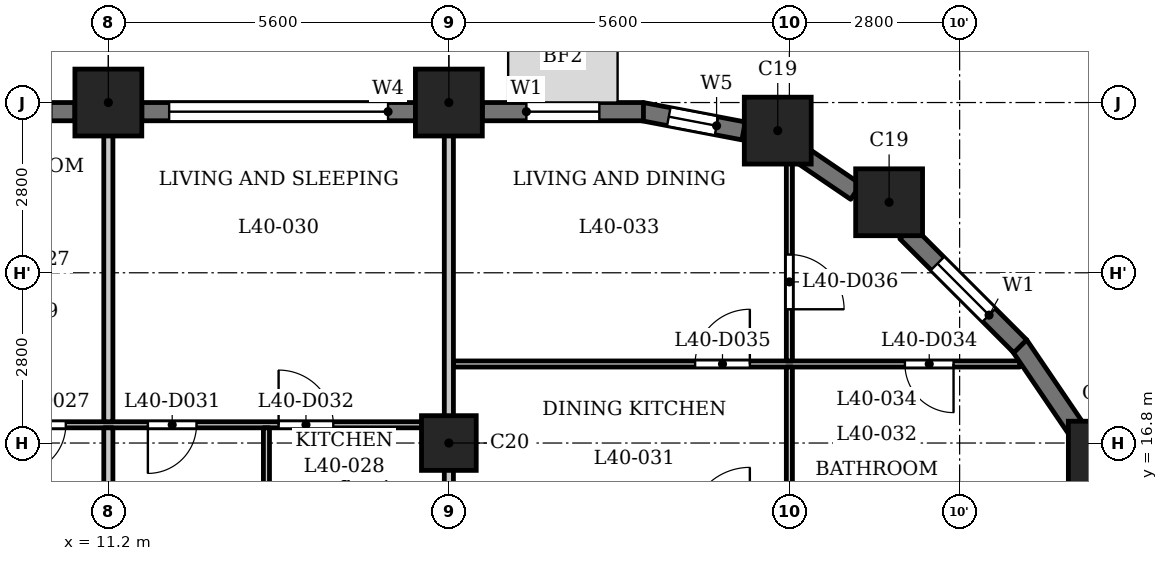
"""IFC4 building model, lengths in metres.
Left out: names, types, materials, properties, quantities, classifications, styles, units other than length and angle.
Written with IfcOpenShell. Run it as: python <this file> out.ifc"""

import sys

from ifc_helpers import new_model, si_unit, direction, frame, frame_2d, origin, origin_2d, place, context, subcontext, project, spatial, rectangle, extrude, element, fill, save


model = new_model("IFC4")
c1 = context("Model", 3, precision=1e-05, world=origin(), true_north=direction((0.0, 1.0)))
c2 = subcontext(c1, "Body", "Model", "MODEL_VIEW")
j1 = project(units=[si_unit("LENGTHUNIT", "METRE"), si_unit("PLANEANGLEUNIT", "RADIAN")], contexts=[c1])
p1 = place(None, origin())
s1 = spatial("IfcSite", under=j1, at=p1, CompositionType="ELEMENT")
p2 = place(p1, origin())
s2 = spatial("IfcBuilding", under=s1, at=p2, CompositionType="ELEMENT")
p3 = place(p2, frame((0.0, 0.0, 157.1)))
s3 = spatial("IfcBuildingStorey", under=s2, at=p3, CompositionType="ELEMENT", Elevation=157.1)
for number, where, z_axis, x_axis in (
    (1, (27.538, 16.609, 0.0), (0.0, 0.0, 1.0), (1.0, 0.0, 0.0)),
    (2, (24.04, 20.76, 0.0), (0.0, 0.0, 1.0), (1.0, 0.0, 0.0)),
    (3, (22.209, 21.938, 0.0), (0.0, 0.0, 1.0), (1.0, 0.0, 0.0)),
    (4, (16.8, 22.4, 0.0), (0.0, 0.0, 1.0), (1.0, 0.0, 0.0)),
    (5, (11.2, 22.4, 0.0), (0.0, 0.0, 1.0), (1.0, 0.0, 0.0)),
):
    element("IfcColumn", number, at=place(p3, frame(where, z_axis=z_axis, x_axis=x_axis)), inside=s3, PredefinedType="COLUMN", context=c2, shape_type="SweptSolid", body=[
        extrude(rectangle(XDim=1.1, YDim=1.1, at=origin_2d()), origin(), (0.0, 0.0, 1.0), 3.5),
    ])
p4 = place(p3, frame((16.8, 16.8, 0.0), z_axis=(0.0, 0.0, 1.0), x_axis=(1.0, 0.0, 0.0)))
e6 = element("IfcColumn", 6, at=p4, inside=s3, PredefinedType="COLUMN", context=c2, shape_type="SweptSolid", body=[
    extrude(rectangle(XDim=0.9, YDim=0.9, at=origin_2d()), origin(), (0.0, 0.0, 1.0), 3.5),
])
p5 = place(p3, frame((27.138, 17.002, 0.0), z_axis=(0.0, 0.0, 1.0), x_axis=(-0.562075160946, 0.827086158419, 0.0)))
e7 = element("IfcWall", 7, at=p5, inside=s3, PredefinedType="SOLIDWALL", context=c2, shape_type="SweptSolid", body=[
    extrude(rectangle(XDim=1.706, YDim=0.3, at=frame_2d((0.853, 0.0))), origin(), (0.0, 0.0, 1.0), 2.45),
])
p6 = place(p3, frame((26.197, 18.391, 0.0), z_axis=(0.0, 0.0, 1.0), x_axis=(-0.707060717099, 0.707152842274, 0.0)))
e8 = element("IfcWall", 8, at=p6, inside=s3, PredefinedType="SOLIDWALL", context=c2, shape_type="SweptSolid", body=[
    extrude(rectangle(XDim=2.65, YDim=0.3, at=frame_2d((1.325, 0.0))), origin(), (0.0, 0.0, 1.0), 2.45),
])
p7 = place(p6, frame((0.725, 0.0, 0.6)))
e9 = element("IfcOpeningElement", 9, at=p7, cuts=e8, PredefinedType="OPENING", context=c2, shape_type="SweptSolid", body=[
    extrude(rectangle(XDim=1.2, YDim=1.55, at=frame_2d((0.6, 0.775))), frame((0.0, 0.16, 0.0), z_axis=(0.0, -1.0, 0.0), x_axis=(1.0, 0.0, 0.0)), (0.0, 0.0, 1.0), 0.32),
])
p8 = place(p3, frame((23.492, 20.932, 0.0), z_axis=(0.0, 0.0, 1.0), x_axis=(-0.826993959827, 0.562210806023, 0.0)))
e10 = element("IfcWall", 10, at=p8, inside=s3, PredefinedType="SOLIDWALL", context=c2, shape_type="SweptSolid", body=[
    extrude(rectangle(XDim=1.077, YDim=0.3, at=frame_2d((0.539, 0.0))), origin(), (0.0, 0.0, 1.0), 3.2),
])
p9 = place(p3, frame((21.648, 21.933, 0.0), z_axis=(0.0, 0.0, 1.0), x_axis=(-0.982297206936, 0.187329114784, 0.0)))
e11 = element("IfcWall", 11, at=p9, inside=s3, PredefinedType="SOLIDWALL", context=c2, shape_type="SweptSolid", body=[
    extrude(rectangle(XDim=1.706, YDim=0.3, at=frame_2d((0.853, 0.0))), origin(), (0.0, 0.0, 1.0), 2.45),
])
p10 = place(p9, frame((0.453, 0.0, 0.6)))
e12 = element("IfcOpeningElement", 12, at=p10, cuts=e11, PredefinedType="OPENING", context=c2, shape_type="SweptSolid", body=[
    extrude(rectangle(XDim=0.8, YDim=1.55, at=frame_2d((0.4, 0.775))), frame((0.0, 0.16, 0.0), z_axis=(0.0, -1.0, 0.0), x_axis=(1.0, 0.0, 0.0)), (0.0, 0.0, 1.0), 0.32),
])
p11 = place(p3, frame((20.0, 22.25, 0.0), z_axis=(0.0, 0.0, 1.0), x_axis=(-1.0, 0.0, 0.0)))
e13 = element("IfcWall", 13, at=p11, inside=s3, PredefinedType="SOLIDWALL", context=c2, shape_type="SweptSolid", body=[
    extrude(rectangle(XDim=2.65, YDim=0.3, at=frame_2d((1.325, 0.0))), origin(), (0.0, 0.0, 1.0), 2.45),
])
p12 = place(p11, frame((0.725, 0.0, 0.6)))
e14 = element("IfcOpeningElement", 14, at=p12, cuts=e13, PredefinedType="OPENING", context=c2, shape_type="SweptSolid", body=[
    extrude(rectangle(XDim=1.2, YDim=1.55, at=frame_2d((0.6, 0.775))), frame((0.0, 0.16, 0.0), z_axis=(0.0, -1.0, 0.0), x_axis=(1.0, 0.0, 0.0)), (0.0, 0.0, 1.0), 0.32),
])
p13 = place(p3, frame((16.25, 22.25, 0.0), z_axis=(0.0, 0.0, 1.0), x_axis=(-1.0, 0.0, 0.0)))
e15 = element("IfcWall", 15, at=p13, inside=s3, PredefinedType="SOLIDWALL", context=c2, shape_type="SweptSolid", body=[
    extrude(rectangle(XDim=4.5, YDim=0.3, at=frame_2d((2.25, 0.0))), origin(), (0.0, 0.0, 1.0), 2.45),
])
p14 = place(p13, frame((0.45, 0.0, 1.2)))
e16 = element("IfcOpeningElement", 16, at=p14, cuts=e15, PredefinedType="OPENING", context=c2, shape_type="SweptSolid", body=[
    extrude(rectangle(XDim=3.6, YDim=0.95, at=frame_2d((1.8, 0.475))), frame((0.0, 0.16, 0.0), z_axis=(0.0, -1.0, 0.0), x_axis=(1.0, 0.0, 0.0)), (0.0, 0.0, 1.0), 0.32),
])
p15 = place(p3, frame((10.65, 22.25, 0.0), z_axis=(0.0, 0.0, 1.0), x_axis=(-1.0, 0.0, 0.0)))
e17 = element("IfcWall", 17, at=p15, inside=s3, PredefinedType="SOLIDWALL", context=c2, shape_type="SweptSolid", body=[
    extrude(rectangle(XDim=4.5, YDim=0.3, at=frame_2d((2.25, 0.0))), origin(), (0.0, 0.0, 1.0), 2.45),
])
p16 = place(p15, frame((0.387, 0.0, 0.6)))
e18 = element("IfcOpeningElement", 18, at=p16, cuts=e17, PredefinedType="OPENING", context=c2, shape_type="SweptSolid", body=[
    extrude(rectangle(XDim=1.2, YDim=1.55, at=frame_2d((0.6, 0.775))), frame((0.0, 0.16, 0.0), z_axis=(0.0, -1.0, 0.0), x_axis=(1.0, 0.0, 0.0)), (0.0, 0.0, 1.0), 0.32),
])
p17 = place(p15, frame((2.413, 0.0, 0.9)))
e19 = element("IfcOpeningElement", 19, at=p17, cuts=e17, PredefinedType="OPENING", context=c2, shape_type="SweptSolid", body=[
    extrude(rectangle(XDim=1.8, YDim=1.25, at=frame_2d((0.9, 0.625))), frame((0.0, 0.16, 0.0), z_axis=(0.0, -1.0, 0.0), x_axis=(1.0, 0.0, 0.0)), (0.0, 0.0, 1.0), 0.32),
])
p18 = place(p3, frame((-16.725, 17.1, 0.0), z_axis=(0.0, 0.0, 1.0), x_axis=(1.0, 0.0, 0.0)))
e20 = element("IfcWall", 20, at=p18, inside=s3, PredefinedType="PARTITIONING", context=c2, shape_type="SweptSolid", body=[
    extrude(rectangle(XDim=33.45, YDim=0.1, at=frame_2d((16.725, 0.0))), origin(), (0.0, 0.0, 1.0), 3.2),
])
p19 = place(p18, frame((11.925, 0.0, 0.0)))
e21 = element("IfcOpeningElement", 21, at=p19, cuts=e20, PredefinedType="OPENING", context=c2, shape_type="SweptSolid", body=[
    extrude(rectangle(XDim=0.9, YDim=2.1, at=frame_2d((0.45, 1.05))), frame((0.0, 0.06, 0.0), z_axis=(0.0, -1.0, 0.0), x_axis=(1.0, 0.0, 0.0)), (0.0, 0.0, 1.0), 0.12),
])
p20 = place(p18, frame((15.175, 0.0, 0.0)))
e22 = element("IfcOpeningElement", 22, at=p20, cuts=e20, PredefinedType="OPENING", context=c2, shape_type="SweptSolid", body=[
    extrude(rectangle(XDim=0.9, YDim=2.1, at=frame_2d((0.45, 1.05))), frame((0.0, 0.06, 0.0), z_axis=(0.0, -1.0, 0.0), x_axis=(1.0, 0.0, 0.0)), (0.0, 0.0, 1.0), 0.12),
])
p21 = place(p18, frame((6.575, 0.0, 0.0)))
e23 = element("IfcOpeningElement", 23, at=p21, cuts=e20, PredefinedType="OPENING", context=c2, shape_type="SweptSolid", body=[
    extrude(rectangle(XDim=0.9, YDim=2.1, at=frame_2d((0.45, 1.05))), frame((0.0, 0.06, 0.0), z_axis=(0.0, -1.0, 0.0), x_axis=(1.0, 0.0, 0.0)), (0.0, 0.0, 1.0), 0.12),
])
p22 = place(p18, frame((17.375, 0.0, 0.0)))
e24 = element("IfcOpeningElement", 24, at=p22, cuts=e20, PredefinedType="OPENING", context=c2, shape_type="SweptSolid", body=[
    extrude(rectangle(XDim=0.8, YDim=2.1, at=frame_2d((0.4, 1.05))), frame((0.0, 0.06, 0.0), z_axis=(0.0, -1.0, 0.0), x_axis=(1.0, 0.0, 0.0)), (0.0, 0.0, 1.0), 0.12),
])
p23 = place(p18, frame((20.025, 0.0, 0.0)))
e25 = element("IfcOpeningElement", 25, at=p23, cuts=e20, PredefinedType="OPENING", context=c2, shape_type="SweptSolid", body=[
    extrude(rectangle(XDim=0.9, YDim=2.1, at=frame_2d((0.45, 1.05))), frame((0.0, 0.06, 0.0), z_axis=(0.0, -1.0, 0.0), x_axis=(1.0, 0.0, 0.0)), (0.0, 0.0, 1.0), 0.12),
])
p24 = place(p18, frame((26.425, 0.0, 0.0)))
e26 = element("IfcOpeningElement", 26, at=p24, cuts=e20, PredefinedType="OPENING", context=c2, shape_type="SweptSolid", body=[
    extrude(rectangle(XDim=0.8, YDim=2.1, at=frame_2d((0.4, 1.05))), frame((0.0, 0.06, 0.0), z_axis=(0.0, -1.0, 0.0), x_axis=(1.0, 0.0, 0.0)), (0.0, 0.0, 1.0), 0.12),
])
p25 = place(p18, frame((23.025, 0.0, 0.0)))
e27 = element("IfcOpeningElement", 27, at=p25, cuts=e20, PredefinedType="OPENING", context=c2, shape_type="SweptSolid", body=[
    extrude(rectangle(XDim=0.9, YDim=2.1, at=frame_2d((0.45, 1.05))), frame((0.0, 0.06, 0.0), z_axis=(0.0, -1.0, 0.0), x_axis=(1.0, 0.0, 0.0)), (0.0, 0.0, 1.0), 0.12),
])
p26 = place(p18, frame((28.575, 0.0, 0.0)))
e28 = element("IfcOpeningElement", 28, at=p26, cuts=e20, PredefinedType="OPENING", context=c2, shape_type="SweptSolid", body=[
    extrude(rectangle(XDim=0.8, YDim=2.1, at=frame_2d((0.4, 1.05))), frame((0.0, 0.06, 0.0), z_axis=(0.0, -1.0, 0.0), x_axis=(1.0, 0.0, 0.0)), (0.0, 0.0, 1.0), 0.12),
])
p27 = place(p18, frame((30.725, 0.0, 0.0)))
e29 = element("IfcOpeningElement", 29, at=p27, cuts=e20, PredefinedType="OPENING", context=c2, shape_type="SweptSolid", body=[
    extrude(rectangle(XDim=0.9, YDim=2.1, at=frame_2d((0.45, 1.05))), frame((0.0, 0.06, 0.0), z_axis=(0.0, -1.0, 0.0), x_axis=(1.0, 0.0, 0.0)), (0.0, 0.0, 1.0), 0.12),
])
p28 = place(p3, frame((16.875, 18.1, 0.0), z_axis=(0.0, 0.0, 1.0), x_axis=(1.0, 0.0, 0.0)))
e30 = element("IfcWall", 30, at=p28, inside=s3, PredefinedType="PARTITIONING", context=c2, shape_type="SweptSolid", body=[
    extrude(rectangle(XDim=9.315, YDim=0.1, at=frame_2d((4.658, 0.0))), origin(), (0.0, 0.0, 1.0), 3.2),
])
p29 = place(p28, frame((7.425, 0.0, 0.0)))
e31 = element("IfcOpeningElement", 31, at=p29, cuts=e30, PredefinedType="OPENING", context=c2, shape_type="SweptSolid", body=[
    extrude(rectangle(XDim=0.8, YDim=2.1, at=frame_2d((0.4, 1.05))), frame((0.0, 0.06, 0.0), z_axis=(0.0, -1.0, 0.0), x_axis=(1.0, 0.0, 0.0)), (0.0, 0.0, 1.0), 0.12),
])
p30 = place(p28, frame((3.975, 0.0, 0.0)))
e32 = element("IfcOpeningElement", 32, at=p30, cuts=e30, PredefinedType="OPENING", context=c2, shape_type="SweptSolid", body=[
    extrude(rectangle(XDim=0.9, YDim=2.1, at=frame_2d((0.45, 1.05))), frame((0.0, 0.06, 0.0), z_axis=(0.0, -1.0, 0.0), x_axis=(1.0, 0.0, 0.0)), (0.0, 0.0, 1.0), 0.12),
])
p31 = place(p3, frame((11.2, 13.275, 0.0), z_axis=(0.0, 0.0, 1.0), x_axis=(0.0, 1.0, 0.0)))
e33 = element("IfcWall", 33, at=p31, inside=s3, PredefinedType="PARTITIONING", context=c2, shape_type="SweptSolid", body=[
    extrude(rectangle(XDim=3.775, YDim=0.15, at=frame_2d((1.888, 0.0))), origin(), (0.0, 0.0, 1.0), 3.2),
])
p32 = place(p3, frame((11.2, 17.15, 0.0), z_axis=(0.0, 0.0, 1.0), x_axis=(0.0, 1.0, 0.0)))
e34 = element("IfcWall", 34, at=p32, inside=s3, PredefinedType="PARTITIONING", context=c2, shape_type="SweptSolid", body=[
    extrude(rectangle(XDim=5.78, YDim=0.15, at=frame_2d((2.89, 0.0))), origin(), (0.0, 0.0, 1.0), 3.2),
])
p33 = place(p3, frame((13.8, 13.275, 0.0), z_axis=(0.0, 0.0, 1.0), x_axis=(0.0, 1.0, 0.0)))
e35 = element("IfcWall", 35, at=p33, inside=s3, PredefinedType="PARTITIONING", context=c2, shape_type="SweptSolid", body=[
    extrude(rectangle(XDim=3.775, YDim=0.1, at=frame_2d((1.888, 0.0))), origin(), (0.0, 0.0, 1.0), 3.2),
])
p34 = place(p3, frame((16.8, 15.475, 0.0), z_axis=(0.0, 0.0, 1.0), x_axis=(0.0, 1.0, 0.0)))
e36 = element("IfcWall", 36, at=p34, inside=s3, PredefinedType="PARTITIONING", context=c2, shape_type="SweptSolid", body=[
    extrude(rectangle(XDim=7.455, YDim=0.15, at=frame_2d((3.728, 0.0))), origin(), (0.0, 0.0, 1.0), 3.2),
])
p35 = place(p3, frame((22.4, 15.475, 0.0), z_axis=(0.0, 0.0, 1.0), x_axis=(0.0, 1.0, 0.0)))
e37 = element("IfcWall", 37, at=p35, inside=s3, PredefinedType="PARTITIONING", context=c2, shape_type="SweptSolid", body=[
    extrude(rectangle(XDim=2.575, YDim=0.1, at=frame_2d((1.288, 0.0))), origin(), (0.0, 0.0, 1.0), 3.2),
])
p36 = place(p3, frame((22.4, 18.15, 0.0), z_axis=(0.0, 0.0, 1.0), x_axis=(0.0, 1.0, 0.0)))
e38 = element("IfcWall", 38, at=p36, inside=s3, PredefinedType="PARTITIONING", context=c2, shape_type="SweptSolid", body=[
    extrude(rectangle(XDim=3.57, YDim=0.1, at=frame_2d((1.785, 0.0))), origin(), (0.0, 0.0, 1.0), 3.2),
])
p37 = place(p36, frame((0.85, 0.0, 0.0)))
e39 = element("IfcOpeningElement", 39, at=p37, cuts=e38, PredefinedType="OPENING", context=c2, shape_type="SweptSolid", body=[
    extrude(rectangle(XDim=0.9, YDim=2.1, at=frame_2d((0.45, 1.05))), frame((0.0, 0.06, 0.0), z_axis=(0.0, -1.0, 0.0), x_axis=(1.0, 0.0, 0.0)), (0.0, 0.0, 1.0), 0.12),
])
p38 = place(p24, origin())
e40 = element("IfcDoor", 40, at=p38, inside=s3, OperationType="SINGLE_SWING_LEFT", PredefinedType="DOOR", context=c2, shape_type="SweptSolid", body=[
    extrude(rectangle(XDim=0.8, YDim=2.1, at=frame_2d((0.4, 1.05))), frame((0.0, 0.025, 0.0), z_axis=(0.0, -1.0, 0.0), x_axis=(1.0, 0.0, 0.0)), (0.0, 0.0, 1.0), 0.05),
])
fill(e26, e40)
p39 = place(p26, origin())
e41 = element("IfcDoor", 41, at=p39, inside=s3, OperationType="SINGLE_SWING_LEFT", PredefinedType="DOOR", context=c2, shape_type="SweptSolid", body=[
    extrude(rectangle(XDim=0.8, YDim=2.1, at=frame_2d((0.4, 1.05))), frame((0.0, 0.025, 0.0), z_axis=(0.0, -1.0, 0.0), x_axis=(1.0, 0.0, 0.0)), (0.0, 0.0, 1.0), 0.05),
])
fill(e28, e41)
p40 = place(p27, origin())
e42 = element("IfcDoor", 42, at=p40, inside=s3, OperationType="SINGLE_SWING_RIGHT", PredefinedType="DOOR", context=c2, shape_type="SweptSolid", body=[
    extrude(rectangle(XDim=0.9, YDim=2.1, at=frame_2d((0.45, 1.05))), frame((0.0, 0.025, 0.0), z_axis=(0.0, -1.0, 0.0), x_axis=(1.0, 0.0, 0.0)), (0.0, 0.0, 1.0), 0.05),
])
fill(e29, e42)
p41 = place(p29, origin())
e43 = element("IfcDoor", 43, at=p41, inside=s3, OperationType="SINGLE_SWING_RIGHT", PredefinedType="DOOR", context=c2, shape_type="SweptSolid", body=[
    extrude(rectangle(XDim=0.8, YDim=2.1, at=frame_2d((0.4, 1.05))), frame((0.0, 0.025, 0.0), z_axis=(0.0, -1.0, 0.0), x_axis=(1.0, 0.0, 0.0)), (0.0, 0.0, 1.0), 0.05),
])
fill(e31, e43)
p42 = place(p30, origin())
e44 = element("IfcDoor", 44, at=p42, inside=s3, OperationType="SINGLE_SWING_LEFT", PredefinedType="DOOR", context=c2, shape_type="SweptSolid", body=[
    extrude(rectangle(XDim=0.9, YDim=2.1, at=frame_2d((0.45, 1.05))), frame((0.0, 0.025, 0.0), z_axis=(0.0, -1.0, 0.0), x_axis=(1.0, 0.0, 0.0)), (0.0, 0.0, 1.0), 0.05),
])
fill(e32, e44)
p43 = place(p37, origin())
e45 = element("IfcDoor", 45, at=p43, inside=s3, OperationType="SINGLE_SWING_LEFT", PredefinedType="DOOR", context=c2, shape_type="SweptSolid", body=[
    extrude(rectangle(XDim=0.9, YDim=2.1, at=frame_2d((0.45, 1.05))), frame((0.0, 0.025, 0.0), z_axis=(0.0, -1.0, 0.0), x_axis=(1.0, 0.0, 0.0)), (0.0, 0.0, 1.0), 0.05),
])
fill(e39, e45)
p44 = place(p7, origin())
e46 = element("IfcWindow", 46, at=p44, inside=s3, PartitioningType="SINGLE_PANEL", PredefinedType="WINDOW", context=c2, shape_type="SweptSolid", body=[
    extrude(rectangle(XDim=1.2, YDim=1.55, at=frame_2d((0.6, 0.775))), frame((0.0, 0.03, 0.0), z_axis=(0.0, -1.0, 0.0), x_axis=(1.0, 0.0, 0.0)), (0.0, 0.0, 1.0), 0.06),
])
fill(e9, e46)
p45 = place(p10, origin())
e47 = element("IfcWindow", 47, at=p45, inside=s3, PartitioningType="SINGLE_PANEL", PredefinedType="WINDOW", context=c2, shape_type="SweptSolid", body=[
    extrude(rectangle(XDim=0.8, YDim=1.55, at=frame_2d((0.4, 0.775))), frame((0.0, 0.03, 0.0), z_axis=(0.0, -1.0, 0.0), x_axis=(1.0, 0.0, 0.0)), (0.0, 0.0, 1.0), 0.06),
])
fill(e12, e47)
p46 = place(p12, origin())
e48 = element("IfcWindow", 48, at=p46, inside=s3, PartitioningType="SINGLE_PANEL", PredefinedType="WINDOW", context=c2, shape_type="SweptSolid", body=[
    extrude(rectangle(XDim=1.2, YDim=1.55, at=frame_2d((0.6, 0.775))), frame((0.0, 0.03, 0.0), z_axis=(0.0, -1.0, 0.0), x_axis=(1.0, 0.0, 0.0)), (0.0, 0.0, 1.0), 0.06),
])
fill(e14, e48)
p47 = place(p14, origin())
e49 = element("IfcWindow", 49, at=p47, inside=s3, PartitioningType="SINGLE_PANEL", PredefinedType="WINDOW", context=c2, shape_type="SweptSolid", body=[
    extrude(rectangle(XDim=3.6, YDim=0.95, at=frame_2d((1.8, 0.475))), frame((0.0, 0.03, 0.0), z_axis=(0.0, -1.0, 0.0), x_axis=(1.0, 0.0, 0.0)), (0.0, 0.0, 1.0), 0.06),
])
fill(e16, e49)
save(model, sys.argv[1])
